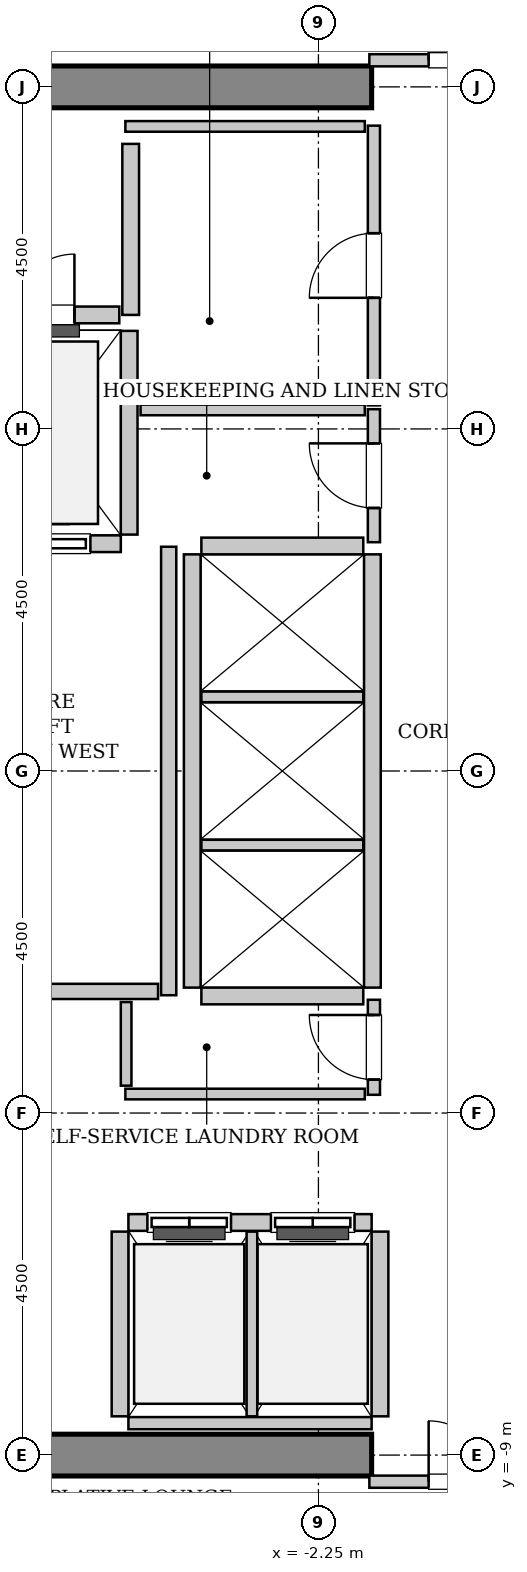
"""IFC4 building model, lengths in metres.
Left out: names, types, materials, properties, quantities, classifications, styles, units other than length and angle.
Written with IfcOpenShell. Run it as: python <this file> out.ifc"""

import sys

from ifc_helpers import new_model, si_unit, direction, frame, frame_2d, origin, place, context, subcontext, project, spatial, rectangle, extrude, source, transform, mapped, element, fill, save


model = new_model("IFC4")
c1 = context("Model", 3, precision=1e-05, world=origin(), true_north=direction((0.0, 1.0)))
c2 = subcontext(c1, "Body", "Model", "MODEL_VIEW")
j1 = project(units=[si_unit("LENGTHUNIT", "METRE"), si_unit("PLANEANGLEUNIT", "RADIAN")], contexts=[c1])
p1 = place(None, origin())
s1 = spatial("IfcSite", under=j1, at=p1, CompositionType="ELEMENT")
p2 = place(p1, origin())
s2 = spatial("IfcBuilding", under=s1, at=p2, CompositionType="ELEMENT")
p3 = place(p2, frame((0.0, 0.0, 171.6)))
s3 = spatial("IfcBuildingStorey", under=s2, at=p3, CompositionType="ELEMENT", Elevation=171.6)
m1 = source(origin(), c2, "Body", "SweptSolid", [
    extrude(rectangle(XDim=9.975, YDim=0.55, at=frame_2d((4.987, 0.0))), origin(), (0.0, 0.0, 1.0), 3.8),
])
for number, where, z_axis, x_axis in (
    (1, (-11.525, 9.0, 0.0), (0.0, 0.0, 1.0), (1.0, 0.0, 0.0)),
    (2, (-11.525, -9.0, 0.0), (0.0, 0.0, 1.0), (1.0, 0.0, 0.0)),
):
    element("IfcWall", number, at=place(p3, frame(where, z_axis=z_axis, x_axis=x_axis)), inside=s3, PredefinedType="SHEAR", context=c2, shape_type="MappedRepresentation", body=[
        mapped(m1, transform((0.0, 0.0, 0.0), x_axis=(1.0, 0.0, 0.0), y_axis=(0.0, 1.0, 0.0), z_axis=(0.0, 0.0, 1.0), scale=1.0)),
    ])
m2 = source(origin(), c2, "Body", "SweptSolid", [
    extrude(rectangle(XDim=2.0, YDim=0.22, at=frame_2d((1.0, 0.0))), origin(), (0.0, 0.0, 1.0), 3.535),
])
p4 = place(p3, frame((-6.85, 2.99, 0.0), z_axis=(0.0, 0.0, 1.0), x_axis=(1.0, 0.0, 0.0)))
e3 = element("IfcWall", 3, at=p4, inside=s3, PredefinedType="SOLIDWALL", context=c2, shape_type="MappedRepresentation", body=[
    mapped(m2, transform((0.0, 0.0, 0.0), x_axis=(1.0, 0.0, 0.0), y_axis=(0.0, 1.0, 0.0), z_axis=(0.0, 0.0, 1.0), scale=1.0)),
])
p5 = place(p4, frame((0.4, 0.0, 0.0)))
e4 = element("IfcOpeningElement", 4, at=p5, cuts=e3, PredefinedType="OPENING", context=c2, shape_type="SweptSolid", body=[
    extrude(rectangle(XDim=1.2, YDim=2.2, at=frame_2d((0.6, 1.1))), frame((0.0, 0.12, 0.0), z_axis=(0.0, -1.0, 0.0), x_axis=(1.0, 0.0, 0.0)), (0.0, 0.0, 1.0), 0.24),
])
m3 = source(origin(), c2, "Body", "SweptSolid", [
    extrude(rectangle(XDim=2.68, YDim=0.22, at=frame_2d((1.34, 0.0))), origin(), (0.0, 0.0, 1.0), 3.535),
])
p6 = place(p3, frame((-4.74, 3.11, 0.0), z_axis=(0.0, 0.0, 1.0), x_axis=(0.0, 1.0, 0.0)))
e5 = element("IfcWall", 5, at=p6, inside=s3, PredefinedType="SOLIDWALL", context=c2, shape_type="MappedRepresentation", body=[
    mapped(m3, transform((0.0, 0.0, 0.0), x_axis=(1.0, 0.0, 0.0), y_axis=(0.0, 1.0, 0.0), z_axis=(0.0, 0.0, 1.0), scale=1.0)),
])
m4 = source(origin(), c2, "Body", "SweptSolid", [
    extrude(rectangle(XDim=3.2, YDim=0.22, at=frame_2d((1.6, 0.0))), origin(), (0.0, 0.0, 1.0), 3.535),
])
p7 = place(p3, frame((-1.55, -5.94, 0.0), z_axis=(0.0, 0.0, 1.0), x_axis=(-1.0, 0.0, 0.0)))
e6 = element("IfcWall", 6, at=p7, inside=s3, PredefinedType="SOLIDWALL", context=c2, shape_type="MappedRepresentation", body=[
    mapped(m4, transform((0.0, 0.0, 0.0), x_axis=(1.0, 0.0, 0.0), y_axis=(0.0, 1.0, 0.0), z_axis=(0.0, 0.0, 1.0), scale=1.0)),
])
p8 = place(p7, frame((1.85, 0.0, 0.0)))
e7 = element("IfcOpeningElement", 7, at=p8, cuts=e6, PredefinedType="OPENING", context=c2, shape_type="SweptSolid", body=[
    extrude(rectangle(XDim=1.1, YDim=2.2, at=frame_2d((0.55, 1.1))), frame((0.0, 0.12, 0.0), z_axis=(0.0, -1.0, 0.0), x_axis=(1.0, 0.0, 0.0)), (0.0, 0.0, 1.0), 0.24),
])
p9 = place(p7, frame((0.225, 0.0, 0.0)))
e8 = element("IfcOpeningElement", 8, at=p9, cuts=e6, PredefinedType="OPENING", context=c2, shape_type="SweptSolid", body=[
    extrude(rectangle(XDim=1.1, YDim=2.2, at=frame_2d((0.55, 1.1))), frame((0.0, 0.12, 0.0), z_axis=(0.0, -1.0, 0.0), x_axis=(1.0, 0.0, 0.0)), (0.0, 0.0, 1.0), 0.24),
])
m5 = source(origin(), c2, "Body", "SweptSolid", [
    extrude(rectangle(XDim=3.2, YDim=0.16, at=frame_2d((1.6, 0.0))), origin(), (0.0, 0.0, 1.0), 2.425),
])
p10 = place(p3, frame((-4.75, -8.58, 0.0), z_axis=(0.0, 0.0, 1.0), x_axis=(1.0, 0.0, 0.0)))
e9 = element("IfcWall", 9, at=p10, inside=s3, PredefinedType="PARTITIONING", context=c2, shape_type="MappedRepresentation", body=[
    mapped(m5, transform((0.0, 0.0, 0.0), x_axis=(1.0, 0.0, 0.0), y_axis=(0.0, 1.0, 0.0), z_axis=(0.0, 0.0, 1.0), scale=1.0)),
])
m6 = source(origin(), c2, "Body", "SweptSolid", [
    extrude(rectangle(XDim=2.43, YDim=0.22, at=frame_2d((1.215, 0.0))), origin(), (0.0, 0.0, 1.0), 3.535),
])
p11 = place(p3, frame((-4.86, -6.06, 0.0), z_axis=(0.0, 0.0, 1.0), x_axis=(0.0, -1.0, 0.0)))
e10 = element("IfcWall", 10, at=p11, inside=s3, PredefinedType="SOLIDWALL", context=c2, shape_type="MappedRepresentation", body=[
    mapped(m6, transform((0.0, 0.0, 0.0), x_axis=(1.0, 0.0, 0.0), y_axis=(0.0, 1.0, 0.0), z_axis=(0.0, 0.0, 1.0), scale=1.0)),
])
m7 = source(origin(), c2, "Body", "SweptSolid", [
    extrude(rectangle(XDim=2.43, YDim=0.14, at=frame_2d((1.215, 0.0))), origin(), (0.0, 0.0, 1.0), 3.535),
])
p12 = place(p3, frame((-3.125, -8.49, 0.0), z_axis=(0.0, 0.0, 1.0), x_axis=(0.0, 1.0, 0.0)))
e11 = element("IfcWall", 11, at=p12, inside=s3, PredefinedType="PARTITIONING", context=c2, shape_type="MappedRepresentation", body=[
    mapped(m7, transform((0.0, 0.0, 0.0), x_axis=(1.0, 0.0, 0.0), y_axis=(0.0, 1.0, 0.0), z_axis=(0.0, 0.0, 1.0), scale=1.0)),
])
p13 = place(p3, frame((-1.44, -8.49, 0.0), z_axis=(0.0, 0.0, 1.0), x_axis=(0.0, 1.0, 0.0)))
e12 = element("IfcWall", 12, at=p13, inside=s3, PredefinedType="SOLIDWALL", context=c2, shape_type="MappedRepresentation", body=[
    mapped(m6, transform((0.0, 0.0, 0.0), x_axis=(1.0, 0.0, 0.0), y_axis=(0.0, 1.0, 0.0), z_axis=(0.0, 0.0, 1.0), scale=1.0)),
])
m8 = source(origin(), c2, "Body", "SweptSolid", [
    extrude(rectangle(XDim=5.7, YDim=0.22, at=frame_2d((2.85, 0.0))), origin(), (0.0, 0.0, 1.0), 3.535),
])
for number, where, z_axis, x_axis in (
    (13, (-1.54, -2.85, 0.0), (0.0, 0.0, 1.0), (0.0, 1.0, 0.0)),
    (14, (-3.91, 2.85, 0.0), (0.0, 0.0, 1.0), (0.0, -1.0, 0.0)),
):
    element("IfcWall", number, at=place(p3, frame(where, z_axis=z_axis, x_axis=x_axis)), inside=s3, PredefinedType="SOLIDWALL", context=c2, shape_type="MappedRepresentation", body=[
        mapped(m8, transform((0.0, 0.0, 0.0), x_axis=(1.0, 0.0, 0.0), y_axis=(0.0, 1.0, 0.0), z_axis=(0.0, 0.0, 1.0), scale=1.0)),
    ])
m9 = source(origin(), c2, "Body", "SweptSolid", [
    extrude(rectangle(XDim=2.13, YDim=0.22, at=frame_2d((1.065, 0.0))), origin(), (0.0, 0.0, 1.0), 3.535),
])
p14 = place(p3, frame((-3.79, -2.96, 0.0), z_axis=(0.0, 0.0, 1.0), x_axis=(1.0, 0.0, 0.0)))
e15 = element("IfcWall", 15, at=p14, inside=s3, PredefinedType="SOLIDWALL", context=c2, shape_type="MappedRepresentation", body=[
    mapped(m9, transform((0.0, 0.0, 0.0), x_axis=(1.0, 0.0, 0.0), y_axis=(0.0, 1.0, 0.0), z_axis=(0.0, 0.0, 1.0), scale=1.0)),
])
m10 = source(origin(), c2, "Body", "SweptSolid", [
    extrude(rectangle(XDim=2.13, YDim=0.14, at=frame_2d((1.065, 0.0))), origin(), (0.0, 0.0, 1.0), 3.535),
])
for number, where, z_axis, x_axis in (
    (16, (-3.79, -0.975, 0.0), (0.0, 0.0, 1.0), (1.0, 0.0, 0.0)),
    (17, (-3.79, 0.975, 0.0), (0.0, 0.0, 1.0), (1.0, 0.0, 0.0)),
):
    element("IfcWall", number, at=place(p3, frame(where, z_axis=z_axis, x_axis=x_axis)), inside=s3, PredefinedType="PARTITIONING", context=c2, shape_type="MappedRepresentation", body=[
        mapped(m10, transform((0.0, 0.0, 0.0), x_axis=(1.0, 0.0, 0.0), y_axis=(0.0, 1.0, 0.0), z_axis=(0.0, 0.0, 1.0), scale=1.0)),
    ])
p15 = place(p3, frame((-1.66, 2.96, 0.0), z_axis=(0.0, 0.0, 1.0), x_axis=(-1.0, 0.0, 0.0)))
e18 = element("IfcWall", 18, at=p15, inside=s3, PredefinedType="SOLIDWALL", context=c2, shape_type="MappedRepresentation", body=[
    mapped(m9, transform((0.0, 0.0, 0.0), x_axis=(1.0, 0.0, 0.0), y_axis=(0.0, 1.0, 0.0), z_axis=(0.0, 0.0, 1.0), scale=1.0)),
])
m11 = source(origin(), c2, "Body", "SweptSolid", [
    extrude(rectangle(XDim=2.25, YDim=0.22, at=frame_2d((1.125, 0.0))), origin(), (0.0, 0.0, 1.0), 3.535),
])
p16 = place(p3, frame((-4.72, 6.0, 0.0), z_axis=(0.0, 0.0, 1.0), x_axis=(0.0, 1.0, 0.0)))
e19 = element("IfcWall", 19, at=p16, inside=s3, PredefinedType="SOLIDWALL", context=c2, shape_type="MappedRepresentation", body=[
    mapped(m11, transform((0.0, 0.0, 0.0), x_axis=(1.0, 0.0, 0.0), y_axis=(0.0, 1.0, 0.0), z_axis=(0.0, 0.0, 1.0), scale=1.0)),
])
m12 = source(origin(), c2, "Body", "SweptSolid", [
    extrude(rectangle(XDim=1.98, YDim=0.22, at=frame_2d((0.99, 0.0))), origin(), (0.0, 0.0, 1.0), 3.535),
])
p17 = place(p3, frame((-6.85, 6.0, 0.0), z_axis=(0.0, 0.0, 1.0), x_axis=(1.0, 0.0, 0.0)))
e20 = element("IfcWall", 20, at=p17, inside=s3, PredefinedType="SOLIDWALL", context=c2, shape_type="MappedRepresentation", body=[
    mapped(m12, transform((0.0, 0.0, 0.0), x_axis=(1.0, 0.0, 0.0), y_axis=(0.0, 1.0, 0.0), z_axis=(0.0, 0.0, 1.0), scale=1.0)),
])
p18 = place(p17, frame((0.59, 0.0, 0.0)))
e21 = element("IfcOpeningElement", 21, at=p18, cuts=e20, PredefinedType="OPENING", context=c2, shape_type="SweptSolid", body=[
    extrude(rectangle(XDim=0.8, YDim=2.0, at=frame_2d((0.4, 1.0))), frame((0.0, 0.12, 0.0), z_axis=(0.0, -1.0, 0.0), x_axis=(1.0, 0.0, 0.0)), (0.0, 0.0, 1.0), 0.24),
])
m13 = source(origin(), c2, "Body", "SweptSolid", [
    extrude(rectangle(XDim=5.9, YDim=0.2, at=frame_2d((2.95, 0.0))), origin(), (0.0, 0.0, 1.0), 3.535),
])
p19 = place(p3, frame((-4.22, -2.95, 0.0), z_axis=(0.0, 0.0, 1.0), x_axis=(0.0, 1.0, 0.0)))
e22 = element("IfcWall", 22, at=p19, inside=s3, PredefinedType="PARTITIONING", context=c2, shape_type="MappedRepresentation", body=[
    mapped(m13, transform((0.0, 0.0, 0.0), x_axis=(1.0, 0.0, 0.0), y_axis=(0.0, 1.0, 0.0), z_axis=(0.0, 0.0, 1.0), scale=1.0)),
])
m14 = source(origin(), c2, "Body", "SweptSolid", [
    extrude(rectangle(XDim=2.9, YDim=0.2, at=frame_2d((1.45, 0.0))), origin(), (0.0, 0.0, 1.0), 3.535),
])
p20 = place(p3, frame((-7.26, -2.9, 0.0), z_axis=(0.0, 0.0, 1.0), x_axis=(1.0, 0.0, 0.0)))
e23 = element("IfcWall", 23, at=p20, inside=s3, PredefinedType="PARTITIONING", context=c2, shape_type="MappedRepresentation", body=[
    mapped(m14, transform((0.0, 0.0, 0.0), x_axis=(1.0, 0.0, 0.0), y_axis=(0.0, 1.0, 0.0), z_axis=(0.0, 0.0, 1.0), scale=1.0)),
])
m15 = source(origin(), c2, "Body", "SweptSolid", [
    extrude(rectangle(XDim=3.16, YDim=0.16, at=frame_2d((1.58, 0.0))), origin(), (0.0, 0.0, 1.0), 2.425),
])
p21 = place(p3, frame((-1.58, 9.35, 0.0), z_axis=(0.0, 0.0, 1.0), x_axis=(1.0, 0.0, 0.0)))
e24 = element("IfcWall", 24, at=p21, inside=s3, PredefinedType="PARTITIONING", context=c2, shape_type="MappedRepresentation", body=[
    mapped(m15, transform((0.0, 0.0, 0.0), x_axis=(1.0, 0.0, 0.0), y_axis=(0.0, 1.0, 0.0), z_axis=(0.0, 0.0, 1.0), scale=1.0)),
])
p22 = place(p21, frame((0.78, 0.0, 0.0)))
e25 = element("IfcOpeningElement", 25, at=p22, cuts=e24, PredefinedType="OPENING", context=c2, shape_type="SweptSolid", body=[
    extrude(rectangle(XDim=1.6, YDim=2.3, at=frame_2d((0.8, 1.15))), frame((0.0, 0.09, 0.0), z_axis=(0.0, -1.0, 0.0), x_axis=(1.0, 0.0, 0.0)), (0.0, 0.0, 1.0), 0.18),
])
p23 = place(p3, frame((-1.58, -9.35, 0.0), z_axis=(0.0, 0.0, 1.0), x_axis=(1.0, 0.0, 0.0)))
e26 = element("IfcWall", 26, at=p23, inside=s3, PredefinedType="PARTITIONING", context=c2, shape_type="MappedRepresentation", body=[
    mapped(m15, transform((0.0, 0.0, 0.0), x_axis=(1.0, 0.0, 0.0), y_axis=(0.0, 1.0, 0.0), z_axis=(0.0, 0.0, 1.0), scale=1.0)),
])
p24 = place(p23, frame((0.78, 0.0, 0.0)))
e27 = element("IfcOpeningElement", 27, at=p24, cuts=e26, PredefinedType="OPENING", context=c2, shape_type="SweptSolid", body=[
    extrude(rectangle(XDim=1.6, YDim=2.3, at=frame_2d((0.8, 1.15))), frame((0.0, 0.09, 0.0), z_axis=(0.0, -1.0, 0.0), x_axis=(1.0, 0.0, 0.0)), (0.0, 0.0, 1.0), 0.18),
])
m16 = source(origin(), c2, "Body", "SweptSolid", [
    extrude(rectangle(XDim=1.75, YDim=0.16, at=frame_2d((0.875, 0.0))), origin(), (0.0, 0.0, 1.0), 3.535),
])
p25 = place(p3, frame((-1.52, 3.01, 0.0), z_axis=(0.0, 0.0, 1.0), x_axis=(0.0, 1.0, 0.0)))
e28 = element("IfcWall", 28, at=p25, inside=s3, PredefinedType="PARTITIONING", context=c2, shape_type="MappedRepresentation", body=[
    mapped(m16, transform((0.0, 0.0, 0.0), x_axis=(1.0, 0.0, 0.0), y_axis=(0.0, 1.0, 0.0), z_axis=(0.0, 0.0, 1.0), scale=1.0)),
])
p26 = place(p25, frame((0.45, 0.0, 0.0)))
e29 = element("IfcOpeningElement", 29, at=p26, cuts=e28, PredefinedType="OPENING", context=c2, shape_type="SweptSolid", body=[
    extrude(rectangle(XDim=0.85, YDim=2.1, at=frame_2d((0.425, 1.05))), frame((0.0, 0.09, 0.0), z_axis=(0.0, -1.0, 0.0), x_axis=(1.0, 0.0, 0.0)), (0.0, 0.0, 1.0), 0.18),
])
m17 = source(origin(), c2, "Body", "SweptSolid", [
    extrude(rectangle(XDim=2.95, YDim=0.14, at=frame_2d((1.475, 0.0))), origin(), (0.0, 0.0, 1.0), 3.535),
])
p27 = place(p3, frame((-4.59, 4.75, 0.0), z_axis=(0.0, 0.0, 1.0), x_axis=(1.0, 0.0, 0.0)))
e30 = element("IfcWall", 30, at=p27, inside=s3, PredefinedType="PARTITIONING", context=c2, shape_type="MappedRepresentation", body=[
    mapped(m17, transform((0.0, 0.0, 0.0), x_axis=(1.0, 0.0, 0.0), y_axis=(0.0, 1.0, 0.0), z_axis=(0.0, 0.0, 1.0), scale=1.0)),
])
m18 = source(origin(), c2, "Body", "SweptSolid", [
    extrude(rectangle(XDim=3.68, YDim=0.16, at=frame_2d((1.84, 0.0))), origin(), (0.0, 0.0, 1.0), 3.535),
])
p28 = place(p3, frame((-1.52, 4.81, 0.0), z_axis=(0.0, 0.0, 1.0), x_axis=(0.0, 1.0, 0.0)))
e31 = element("IfcWall", 31, at=p28, inside=s3, PredefinedType="PARTITIONING", context=c2, shape_type="MappedRepresentation", body=[
    mapped(m18, transform((0.0, 0.0, 0.0), x_axis=(1.0, 0.0, 0.0), y_axis=(0.0, 1.0, 0.0), z_axis=(0.0, 0.0, 1.0), scale=1.0)),
])
p29 = place(p28, frame((1.415, 0.0, 0.0)))
e32 = element("IfcOpeningElement", 32, at=p29, cuts=e31, PredefinedType="OPENING", context=c2, shape_type="SweptSolid", body=[
    extrude(rectangle(XDim=0.85, YDim=2.1, at=frame_2d((0.425, 1.05))), frame((0.0, 0.09, 0.0), z_axis=(0.0, -1.0, 0.0), x_axis=(1.0, 0.0, 0.0)), (0.0, 0.0, 1.0), 0.18),
])
m19 = source(origin(), c2, "Body", "SweptSolid", [
    extrude(rectangle(XDim=3.15, YDim=0.14, at=frame_2d((1.575, 0.0))), origin(), (0.0, 0.0, 1.0), 3.535),
])
p30 = place(p3, frame((-4.79, 8.48, 0.0), z_axis=(0.0, 0.0, 1.0), x_axis=(1.0, 0.0, 0.0)))
e33 = element("IfcWall", 33, at=p30, inside=s3, PredefinedType="PARTITIONING", context=c2, shape_type="MappedRepresentation", body=[
    mapped(m19, transform((0.0, 0.0, 0.0), x_axis=(1.0, 0.0, 0.0), y_axis=(0.0, 1.0, 0.0), z_axis=(0.0, 0.0, 1.0), scale=1.0)),
])
m20 = source(origin(), c2, "Body", "SweptSolid", [
    extrude(rectangle(XDim=1.25, YDim=0.16, at=frame_2d((0.625, 0.0))), origin(), (0.0, 0.0, 1.0), 3.535),
])
p31 = place(p3, frame((-1.52, -4.26, 0.0), z_axis=(0.0, 0.0, 1.0), x_axis=(0.0, 1.0, 0.0)))
e34 = element("IfcWall", 34, at=p31, inside=s3, PredefinedType="PARTITIONING", context=c2, shape_type="MappedRepresentation", body=[
    mapped(m20, transform((0.0, 0.0, 0.0), x_axis=(1.0, 0.0, 0.0), y_axis=(0.0, 1.0, 0.0), z_axis=(0.0, 0.0, 1.0), scale=1.0)),
])
p32 = place(p31, frame((0.2, 0.0, 0.0)))
e35 = element("IfcOpeningElement", 35, at=p32, cuts=e34, PredefinedType="OPENING", context=c2, shape_type="SweptSolid", body=[
    extrude(rectangle(XDim=0.85, YDim=2.1, at=frame_2d((0.425, 1.05))), frame((0.0, 0.09, 0.0), z_axis=(0.0, -1.0, 0.0), x_axis=(1.0, 0.0, 0.0)), (0.0, 0.0, 1.0), 0.18),
])
p33 = place(p3, frame((-4.79, -4.25, 0.0), z_axis=(0.0, 0.0, 1.0), x_axis=(1.0, 0.0, 0.0)))
e36 = element("IfcWall", 36, at=p33, inside=s3, PredefinedType="PARTITIONING", context=c2, shape_type="MappedRepresentation", body=[
    mapped(m19, transform((0.0, 0.0, 0.0), x_axis=(1.0, 0.0, 0.0), y_axis=(0.0, 1.0, 0.0), z_axis=(0.0, 0.0, 1.0), scale=1.0)),
])
m21 = source(origin(), c2, "Body", "SweptSolid", [
    extrude(rectangle(XDim=1.1, YDim=0.14, at=frame_2d((0.55, 0.0))), origin(), (0.0, 0.0, 1.0), 3.535),
])
p34 = place(p3, frame((-4.78, -4.14, 0.0), z_axis=(0.0, 0.0, 1.0), x_axis=(0.0, 1.0, 0.0)))
e37 = element("IfcWall", 37, at=p34, inside=s3, PredefinedType="PARTITIONING", context=c2, shape_type="MappedRepresentation", body=[
    mapped(m21, transform((0.0, 0.0, 0.0), x_axis=(1.0, 0.0, 0.0), y_axis=(0.0, 1.0, 0.0), z_axis=(0.0, 0.0, 1.0), scale=1.0)),
])
m22 = source(origin(), c2, "Body", "SweptSolid", [
    extrude(rectangle(XDim=1.2, YDim=2.2, at=frame_2d((0.6, 1.1))), frame((0.0, 0.025, 0.0), z_axis=(0.0, -1.0, 0.0), x_axis=(1.0, 0.0, 0.0)), (0.0, 0.0, 1.0), 0.05),
])
p35 = place(p5, origin())
e38 = element("IfcDoor", 38, at=p35, inside=s3, OperationType="SLIDING_TO_LEFT", PredefinedType="DOOR", context=c2, shape_type="MappedRepresentation", body=[
    mapped(m22, transform((0.0, 0.0, 0.0), x_axis=(1.0, 0.0, 0.0), y_axis=(0.0, 1.0, 0.0), z_axis=(0.0, 0.0, 1.0), scale=1.0)),
])
fill(e4, e38)
m23 = source(origin(), c2, "Body", "SweptSolid", [
    extrude(rectangle(XDim=1.1, YDim=2.2, at=frame_2d((0.55, 1.1))), frame((0.0, 0.025, 0.0), z_axis=(0.0, -1.0, 0.0), x_axis=(1.0, 0.0, 0.0)), (0.0, 0.0, 1.0), 0.05),
])
p36 = place(p8, origin())
e39 = element("IfcDoor", 39, at=p36, inside=s3, OperationType="DOUBLE_DOOR_SLIDING", PredefinedType="DOOR", context=c2, shape_type="MappedRepresentation", body=[
    mapped(m23, transform((0.0, 0.0, 0.0), x_axis=(1.0, 0.0, 0.0), y_axis=(0.0, 1.0, 0.0), z_axis=(0.0, 0.0, 1.0), scale=1.0)),
])
fill(e7, e39)
p37 = place(p9, origin())
e40 = element("IfcDoor", 40, at=p37, inside=s3, OperationType="DOUBLE_DOOR_SLIDING", PredefinedType="DOOR", context=c2, shape_type="MappedRepresentation", body=[
    mapped(m23, transform((0.0, 0.0, 0.0), x_axis=(1.0, 0.0, 0.0), y_axis=(0.0, 1.0, 0.0), z_axis=(0.0, 0.0, 1.0), scale=1.0)),
])
fill(e8, e40)
m24 = source(origin(), c2, "Body", "SweptSolid", [
    extrude(rectangle(XDim=0.8, YDim=2.0, at=frame_2d((0.4, 1.0))), frame((0.0, 0.025, 0.0), z_axis=(0.0, -1.0, 0.0), x_axis=(1.0, 0.0, 0.0)), (0.0, 0.0, 1.0), 0.05),
])
p38 = place(p18, origin())
e41 = element("IfcDoor", 41, at=p38, inside=s3, OperationType="SINGLE_SWING_RIGHT", PredefinedType="TRAPDOOR", context=c2, shape_type="MappedRepresentation", body=[
    mapped(m24, transform((0.0, 0.0, 0.0), x_axis=(1.0, 0.0, 0.0), y_axis=(0.0, 1.0, 0.0), z_axis=(0.0, 0.0, 1.0), scale=1.0)),
])
fill(e21, e41)
m25 = source(origin(), c2, "Body", "SweptSolid", [
    extrude(rectangle(XDim=1.6, YDim=2.3, at=frame_2d((0.8, 1.15))), frame((0.0, 0.025, 0.0), z_axis=(0.0, -1.0, 0.0), x_axis=(1.0, 0.0, 0.0)), (0.0, 0.0, 1.0), 0.05),
])
p39 = place(p22, origin())
e42 = element("IfcDoor", 42, at=p39, inside=s3, OperationType="DOUBLE_DOOR_SINGLE_SWING", PredefinedType="DOOR", context=c2, shape_type="MappedRepresentation", body=[
    mapped(m25, transform((0.0, 0.0, 0.0), x_axis=(1.0, 0.0, 0.0), y_axis=(0.0, 1.0, 0.0), z_axis=(0.0, 0.0, 1.0), scale=1.0)),
])
fill(e25, e42)
p40 = place(p24, origin())
e43 = element("IfcDoor", 43, at=p40, inside=s3, OperationType="DOUBLE_DOOR_SINGLE_SWING", PredefinedType="DOOR", context=c2, shape_type="MappedRepresentation", body=[
    mapped(m25, transform((0.0, 0.0, 0.0), x_axis=(1.0, 0.0, 0.0), y_axis=(0.0, 1.0, 0.0), z_axis=(0.0, 0.0, 1.0), scale=1.0)),
])
fill(e27, e43)
m26 = source(origin(), c2, "Body", "SweptSolid", [
    extrude(rectangle(XDim=0.85, YDim=2.1, at=frame_2d((0.425, 1.05))), frame((0.0, 0.025, 0.0), z_axis=(0.0, -1.0, 0.0), x_axis=(1.0, 0.0, 0.0)), (0.0, 0.0, 1.0), 0.05),
])
p41 = place(p26, origin())
e44 = element("IfcDoor", 44, at=p41, inside=s3, OperationType="SINGLE_SWING_RIGHT", PredefinedType="DOOR", context=c2, shape_type="MappedRepresentation", body=[
    mapped(m26, transform((0.0, 0.0, 0.0), x_axis=(1.0, 0.0, 0.0), y_axis=(0.0, 1.0, 0.0), z_axis=(0.0, 0.0, 1.0), scale=1.0)),
])
fill(e29, e44)
p42 = place(p29, origin())
e45 = element("IfcDoor", 45, at=p42, inside=s3, OperationType="SINGLE_SWING_LEFT", PredefinedType="DOOR", context=c2, shape_type="MappedRepresentation", body=[
    mapped(m26, transform((0.0, 0.0, 0.0), x_axis=(1.0, 0.0, 0.0), y_axis=(0.0, 1.0, 0.0), z_axis=(0.0, 0.0, 1.0), scale=1.0)),
])
fill(e32, e45)
p43 = place(p32, origin())
e46 = element("IfcDoor", 46, at=p43, inside=s3, OperationType="SINGLE_SWING_RIGHT", PredefinedType="DOOR", context=c2, shape_type="MappedRepresentation", body=[
    mapped(m26, transform((0.0, 0.0, 0.0), x_axis=(1.0, 0.0, 0.0), y_axis=(0.0, 1.0, 0.0), z_axis=(0.0, 0.0, 1.0), scale=1.0)),
])
fill(e35, e46)
save(model, sys.argv[1])
